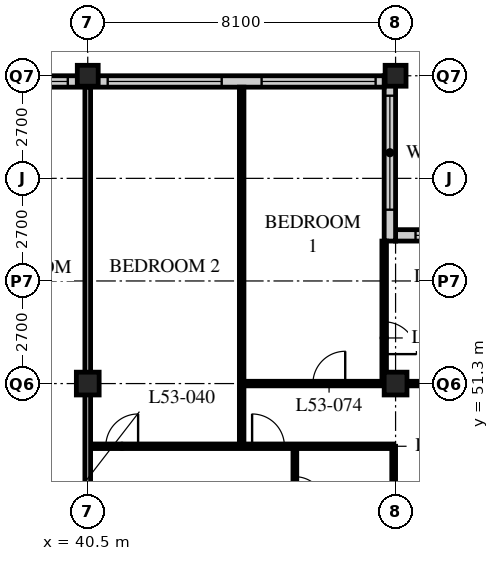
"""IFC4 building model, lengths in metres.
Left out: names, types, materials, properties, quantities, classifications, styles, units other than length and angle.
Written with IfcOpenShell. Run it as: python <this file> out.ifc"""

import sys

from ifc_helpers import new_model, si_unit, direction, frame, frame_2d, origin, origin_2d, place, context, subcontext, project, spatial, rectangle, hollow_rectangle, extrude, element, fill, save


model = new_model("IFC4")
c1 = context("Model", 3, precision=1e-05, world=origin(), true_north=direction((0.0, 1.0)))
c2 = subcontext(c1, "Body", "Model", "MODEL_VIEW")
j1 = project(units=[si_unit("LENGTHUNIT", "METRE"), si_unit("PLANEANGLEUNIT", "RADIAN")], contexts=[c1])
p1 = place(None, origin())
s1 = spatial("IfcSite", under=j1, at=p1, CompositionType="ELEMENT")
p2 = place(p1, origin())
s2 = spatial("IfcBuilding", under=s1, at=p2, CompositionType="ELEMENT")
p3 = place(p2, frame((0.0, 0.0, 206.4)))
s3 = spatial("IfcBuildingStorey", under=s2, at=p3, CompositionType="ELEMENT", Elevation=206.4)
p4 = place(p3, frame((40.5, 51.3, 0.0), z_axis=(0.0, 0.0, 1.0), x_axis=(1.0, 0.0, 0.0)))
e1 = element("IfcColumn", 1, at=p4, inside=s3, PredefinedType="COLUMN", context=c2, shape_type="SweptSolid", body=[
    extrude(hollow_rectangle(XDim=0.6, YDim=0.6, WallThickness=0.05, at=origin_2d()), origin(), (0.0, 0.0, 1.0), 3.6),
])
p5 = place(p3, frame((40.5, 59.4, 0.0), z_axis=(0.0, 0.0, 1.0), x_axis=(1.0, 0.0, 0.0)))
e2 = element("IfcColumn", 2, at=p5, inside=s3, PredefinedType="COLUMN", context=c2, shape_type="SweptSolid", body=[
    extrude(hollow_rectangle(XDim=0.55, YDim=0.55, WallThickness=0.045, at=origin_2d()), origin(), (0.0, 0.0, 1.0), 3.6),
])
p6 = place(p3, frame((48.6, 51.3, 0.0), z_axis=(0.0, 0.0, 1.0), x_axis=(1.0, 0.0, 0.0)))
e3 = element("IfcColumn", 3, at=p6, inside=s3, PredefinedType="COLUMN", context=c2, shape_type="SweptSolid", body=[
    extrude(hollow_rectangle(XDim=0.6, YDim=0.6, WallThickness=0.05, at=origin_2d()), origin(), (0.0, 0.0, 1.0), 3.6),
])
p7 = place(p3, frame((48.6, 59.4, 0.0), z_axis=(0.0, 0.0, 1.0), x_axis=(1.0, 0.0, 0.0)))
e4 = element("IfcColumn", 4, at=p7, inside=s3, PredefinedType="COLUMN", context=c2, shape_type="SweptSolid", body=[
    extrude(hollow_rectangle(XDim=0.55, YDim=0.55, WallThickness=0.045, at=origin_2d()), origin(), (0.0, 0.0, 1.0), 3.6),
])
p8 = place(p3, frame((52.35, 55.2, 0.0), z_axis=(0.0, 0.0, 1.0), x_axis=(-1.0, 0.0, 0.0)))
e5 = element("IfcWall", 5, at=p8, inside=s3, PredefinedType="SOLIDWALL", context=c2, shape_type="SweptSolid", body=[
    extrude(rectangle(XDim=3.75, YDim=0.3, at=frame_2d((1.875, 0.0))), origin(), (0.0, 0.0, 1.0), 3.39),
])
p9 = place(p8, frame((0.225, 0.0, 0.6)))
e6 = element("IfcOpeningElement", 6, at=p9, cuts=e5, PredefinedType="OPENING", context=c2, shape_type="SweptSolid", body=[
    extrude(rectangle(XDim=3.0, YDim=2.0, at=frame_2d((1.5, 1.0))), frame((0.0, 0.16, 0.0), z_axis=(0.0, -1.0, 0.0), x_axis=(1.0, 0.0, 0.0)), (0.0, 0.0, 1.0), 0.32),
])
p10 = place(p3, frame((48.45, 55.05, 0.0), z_axis=(0.0, 0.0, 1.0), x_axis=(0.0, 1.0, 0.0)))
e7 = element("IfcWall", 7, at=p10, inside=s3, PredefinedType="SOLIDWALL", context=c2, shape_type="SweptSolid", body=[
    extrude(rectangle(XDim=4.35, YDim=0.3, at=frame_2d((2.175, 0.0))), origin(), (0.0, 0.0, 1.0), 3.39),
])
p11 = place(p10, frame((0.825, 0.0, 0.6)))
e8 = element("IfcOpeningElement", 8, at=p11, cuts=e7, PredefinedType="OPENING", context=c2, shape_type="SweptSolid", body=[
    extrude(rectangle(XDim=3.0, YDim=2.0, at=frame_2d((1.5, 1.0))), frame((0.0, 0.16, 0.0), z_axis=(0.0, -1.0, 0.0), x_axis=(1.0, 0.0, 0.0)), (0.0, 0.0, 1.0), 0.32),
])
p12 = place(p3, frame((48.3, 59.25, 0.0), z_axis=(0.0, 0.0, 1.0), x_axis=(-1.0, 0.0, 0.0)))
e9 = element("IfcWall", 9, at=p12, inside=s3, PredefinedType="SOLIDWALL", context=c2, shape_type="SweptSolid", body=[
    extrude(rectangle(XDim=40.2, YDim=0.3, at=frame_2d((20.1, 0.0))), origin(), (0.0, 0.0, 1.0), 3.39),
])
p13 = place(p12, frame((0.225, 0.0, 0.6)))
e10 = element("IfcOpeningElement", 10, at=p13, cuts=e9, PredefinedType="OPENING", context=c2, shape_type="SweptSolid", body=[
    extrude(rectangle(XDim=3.0, YDim=2.4, at=frame_2d((1.5, 1.2))), frame((0.0, 0.16, 0.0), z_axis=(0.0, -1.0, 0.0), x_axis=(1.0, 0.0, 0.0)), (0.0, 0.0, 1.0), 0.32),
])
p14 = place(p12, frame((4.275, 0.0, 0.6)))
e11 = element("IfcOpeningElement", 11, at=p14, cuts=e9, PredefinedType="OPENING", context=c2, shape_type="SweptSolid", body=[
    extrude(rectangle(XDim=3.0, YDim=2.4, at=frame_2d((1.5, 1.2))), frame((0.0, 0.16, 0.0), z_axis=(0.0, -1.0, 0.0), x_axis=(1.0, 0.0, 0.0)), (0.0, 0.0, 1.0), 0.32),
])
p15 = place(p12, frame((8.325, 0.0, 0.6)))
e12 = element("IfcOpeningElement", 12, at=p15, cuts=e9, PredefinedType="OPENING", context=c2, shape_type="SweptSolid", body=[
    extrude(rectangle(XDim=3.0, YDim=2.4, at=frame_2d((1.5, 1.2))), frame((0.0, 0.16, 0.0), z_axis=(0.0, -1.0, 0.0), x_axis=(1.0, 0.0, 0.0)), (0.0, 0.0, 1.0), 0.32),
])
p16 = place(p12, frame((12.375, 0.0, 0.6)))
e13 = element("IfcOpeningElement", 13, at=p16, cuts=e9, PredefinedType="OPENING", context=c2, shape_type="SweptSolid", body=[
    extrude(rectangle(XDim=3.0, YDim=2.4, at=frame_2d((1.5, 1.2))), frame((0.0, 0.16, 0.0), z_axis=(0.0, -1.0, 0.0), x_axis=(1.0, 0.0, 0.0)), (0.0, 0.0, 1.0), 0.32),
])
p17 = place(p12, frame((16.425, 0.0, 0.6)))
e14 = element("IfcOpeningElement", 14, at=p17, cuts=e9, PredefinedType="OPENING", context=c2, shape_type="SweptSolid", body=[
    extrude(rectangle(XDim=3.0, YDim=2.4, at=frame_2d((1.5, 1.2))), frame((0.0, 0.16, 0.0), z_axis=(0.0, -1.0, 0.0), x_axis=(1.0, 0.0, 0.0)), (0.0, 0.0, 1.0), 0.32),
])
p18 = place(p12, frame((20.475, 0.0, 0.6)))
e15 = element("IfcOpeningElement", 15, at=p18, cuts=e9, PredefinedType="OPENING", context=c2, shape_type="SweptSolid", body=[
    extrude(rectangle(XDim=3.0, YDim=2.4, at=frame_2d((1.5, 1.2))), frame((0.0, 0.16, 0.0), z_axis=(0.0, -1.0, 0.0), x_axis=(1.0, 0.0, 0.0)), (0.0, 0.0, 1.0), 0.32),
])
p19 = place(p12, frame((24.525, 0.0, 0.6)))
e16 = element("IfcOpeningElement", 16, at=p19, cuts=e9, PredefinedType="OPENING", context=c2, shape_type="SweptSolid", body=[
    extrude(rectangle(XDim=3.0, YDim=2.4, at=frame_2d((1.5, 1.2))), frame((0.0, 0.16, 0.0), z_axis=(0.0, -1.0, 0.0), x_axis=(1.0, 0.0, 0.0)), (0.0, 0.0, 1.0), 0.32),
])
p20 = place(p12, frame((28.575, 0.0, 0.6)))
e17 = element("IfcOpeningElement", 17, at=p20, cuts=e9, PredefinedType="OPENING", context=c2, shape_type="SweptSolid", body=[
    extrude(rectangle(XDim=3.0, YDim=2.4, at=frame_2d((1.5, 1.2))), frame((0.0, 0.16, 0.0), z_axis=(0.0, -1.0, 0.0), x_axis=(1.0, 0.0, 0.0)), (0.0, 0.0, 1.0), 0.32),
])
p21 = place(p12, frame((32.625, 0.0, 0.6)))
e18 = element("IfcOpeningElement", 18, at=p21, cuts=e9, PredefinedType="OPENING", context=c2, shape_type="SweptSolid", body=[
    extrude(rectangle(XDim=3.0, YDim=2.4, at=frame_2d((1.5, 1.2))), frame((0.0, 0.16, 0.0), z_axis=(0.0, -1.0, 0.0), x_axis=(1.0, 0.0, 0.0)), (0.0, 0.0, 1.0), 0.32),
])
p22 = place(p12, frame((36.675, 0.0, 0.6)))
e19 = element("IfcOpeningElement", 19, at=p22, cuts=e9, PredefinedType="OPENING", context=c2, shape_type="SweptSolid", body=[
    extrude(rectangle(XDim=3.0, YDim=2.4, at=frame_2d((1.5, 1.2))), frame((0.0, 0.16, 0.0), z_axis=(0.0, -1.0, 0.0), x_axis=(1.0, 0.0, 0.0)), (0.0, 0.0, 1.0), 0.32),
])
p23 = place(p3, frame((40.5, 49.65, 0.0), z_axis=(0.0, 0.0, 1.0), x_axis=(1.0, 0.0, 0.0)))
e20 = element("IfcWall", 20, at=p23, inside=s3, PredefinedType="PARTITIONING", context=c2, shape_type="SweptSolid", body=[
    extrude(rectangle(XDim=8.05, YDim=0.12, at=frame_2d((4.025, 0.0))), origin(), (0.0, 0.0, 1.0), 3.39),
])
p24 = place(p23, frame((0.475, 0.0, 0.0)))
e21 = element("IfcOpeningElement", 21, at=p24, cuts=e20, PredefinedType="OPENING", context=c2, shape_type="SweptSolid", body=[
    extrude(rectangle(XDim=0.85, YDim=2.1, at=frame_2d((0.425, 1.05))), frame((0.0, 0.07, 0.0), z_axis=(0.0, -1.0, 0.0), x_axis=(1.0, 0.0, 0.0)), (0.0, 0.0, 1.0), 0.14),
])
p25 = place(p23, frame((4.325, 0.0, 0.0)))
e22 = element("IfcOpeningElement", 22, at=p25, cuts=e20, PredefinedType="OPENING", context=c2, shape_type="SweptSolid", body=[
    extrude(rectangle(XDim=0.85, YDim=2.1, at=frame_2d((0.425, 1.05))), frame((0.0, 0.07, 0.0), z_axis=(0.0, -1.0, 0.0), x_axis=(1.0, 0.0, 0.0)), (0.0, 0.0, 1.0), 0.14),
])
p26 = place(p3, frame((45.95, 47.25, 0.0), z_axis=(0.0, 0.0, 1.0), x_axis=(0.0, 1.0, 0.0)))
e23 = element("IfcWall", 23, at=p26, inside=s3, PredefinedType="PARTITIONING", context=c2, shape_type="SweptSolid", body=[
    extrude(rectangle(XDim=2.4, YDim=0.1, at=frame_2d((1.2, 0.0))), origin(), (0.0, 0.0, 1.0), 3.39),
])
p27 = place(p26, frame((0.8, 0.0, 0.0)))
e24 = element("IfcOpeningElement", 24, at=p27, cuts=e23, PredefinedType="OPENING", context=c2, shape_type="SweptSolid", body=[
    extrude(rectangle(XDim=0.8, YDim=2.1, at=frame_2d((0.4, 1.05))), frame((0.0, 0.06, 0.0), z_axis=(0.0, -1.0, 0.0), x_axis=(1.0, 0.0, 0.0)), (0.0, 0.0, 1.0), 0.12),
])
p28 = place(p3, frame((48.55, 47.25, 0.0), z_axis=(0.0, 0.0, 1.0), x_axis=(0.0, 1.0, 0.0)))
e25 = element("IfcWall", 25, at=p28, inside=s3, PredefinedType="PARTITIONING", context=c2, shape_type="SweptSolid", body=[
    extrude(rectangle(XDim=2.4, YDim=0.1, at=frame_2d((1.2, 0.0))), origin(), (0.0, 0.0, 1.0), 2.778),
])
p29 = place(p3, frame((44.55, 49.65, 0.0), z_axis=(0.0, 0.0, 1.0), x_axis=(0.0, 1.0, 0.0)))
e26 = element("IfcWall", 26, at=p29, inside=s3, PredefinedType="PARTITIONING", context=c2, shape_type="SweptSolid", body=[
    extrude(rectangle(XDim=9.45, YDim=0.12, at=frame_2d((4.725, 0.0))), origin(), (0.0, 0.0, 1.0), 3.39),
])
p30 = place(p3, frame((44.55, 51.3, 0.0), z_axis=(0.0, 0.0, 1.0), x_axis=(1.0, 0.0, 0.0)))
e27 = element("IfcWall", 27, at=p30, inside=s3, PredefinedType="PARTITIONING", context=c2, shape_type="SweptSolid", body=[
    extrude(rectangle(XDim=7.8, YDim=0.12, at=frame_2d((3.9, 0.0))), origin(), (0.0, 0.0, 1.0), 2.778),
])
p31 = place(p30, frame((1.875, 0.0, 0.0)))
e28 = element("IfcOpeningElement", 28, at=p31, cuts=e27, PredefinedType="OPENING", context=c2, shape_type="SweptSolid", body=[
    extrude(rectangle(XDim=0.85, YDim=2.1, at=frame_2d((0.425, 1.05))), frame((0.0, 0.07, 0.0), z_axis=(0.0, -1.0, 0.0), x_axis=(1.0, 0.0, 0.0)), (0.0, 0.0, 1.0), 0.14),
])
p32 = place(p3, frame((40.5, 47.25, 0.0), z_axis=(0.0, 0.0, 1.0), x_axis=(0.0, 1.0, 0.0)))
e29 = element("IfcWall", 29, at=p32, inside=s3, PredefinedType="PARTITIONING", context=c2, shape_type="SweptSolid", body=[
    extrude(rectangle(XDim=11.85, YDim=0.15, at=frame_2d((5.925, 0.0))), origin(), (0.0, 0.0, 1.0), 2.778),
])
p33 = place(p3, frame((48.3, 51.3, 0.0), z_axis=(0.0, 0.0, 1.0), x_axis=(0.0, 1.0, 0.0)))
e30 = element("IfcWall", 30, at=p33, inside=s3, PredefinedType="PARTITIONING", context=c2, shape_type="SweptSolid", body=[
    extrude(rectangle(XDim=3.75, YDim=0.12, at=frame_2d((1.875, 0.0))), origin(), (0.0, 0.0, 1.0), 3.39),
])
p34 = place(p33, frame((0.775, 0.0, 0.0)))
e31 = element("IfcOpeningElement", 31, at=p34, cuts=e30, PredefinedType="OPENING", context=c2, shape_type="SweptSolid", body=[
    extrude(rectangle(XDim=0.85, YDim=2.1, at=frame_2d((0.425, 1.05))), frame((0.0, 0.07, 0.0), z_axis=(0.0, -1.0, 0.0), x_axis=(1.0, 0.0, 0.0)), (0.0, 0.0, 1.0), 0.14),
])
p35 = place(p9, origin())
e32 = element("IfcWindow", 32, at=p35, inside=s3, PartitioningType="SINGLE_PANEL", PredefinedType="WINDOW", context=c2, shape_type="SweptSolid", body=[
    extrude(rectangle(XDim=3.0, YDim=2.0, at=frame_2d((1.5, 1.0))), frame((0.0, 0.03, 0.0), z_axis=(0.0, -1.0, 0.0), x_axis=(1.0, 0.0, 0.0)), (0.0, 0.0, 1.0), 0.06),
])
fill(e6, e32)
p36 = place(p11, origin())
e33 = element("IfcWindow", 33, at=p36, inside=s3, PartitioningType="SINGLE_PANEL", PredefinedType="WINDOW", context=c2, shape_type="SweptSolid", body=[
    extrude(rectangle(XDim=3.0, YDim=2.0, at=frame_2d((1.5, 1.0))), frame((0.0, 0.03, 0.0), z_axis=(0.0, -1.0, 0.0), x_axis=(1.0, 0.0, 0.0)), (0.0, 0.0, 1.0), 0.06),
])
fill(e8, e33)
p37 = place(p13, origin())
e34 = element("IfcWindow", 34, at=p37, inside=s3, PartitioningType="SINGLE_PANEL", PredefinedType="WINDOW", context=c2, shape_type="SweptSolid", body=[
    extrude(rectangle(XDim=3.0, YDim=2.4, at=frame_2d((1.5, 1.2))), frame((0.0, 0.03, 0.0), z_axis=(0.0, -1.0, 0.0), x_axis=(1.0, 0.0, 0.0)), (0.0, 0.0, 1.0), 0.06),
])
fill(e10, e34)
p38 = place(p14, origin())
e35 = element("IfcWindow", 35, at=p38, inside=s3, PartitioningType="SINGLE_PANEL", PredefinedType="WINDOW", context=c2, shape_type="SweptSolid", body=[
    extrude(rectangle(XDim=3.0, YDim=2.4, at=frame_2d((1.5, 1.2))), frame((0.0, 0.03, 0.0), z_axis=(0.0, -1.0, 0.0), x_axis=(1.0, 0.0, 0.0)), (0.0, 0.0, 1.0), 0.06),
])
fill(e11, e35)
p39 = place(p15, origin())
e36 = element("IfcWindow", 36, at=p39, inside=s3, PartitioningType="SINGLE_PANEL", PredefinedType="WINDOW", context=c2, shape_type="SweptSolid", body=[
    extrude(rectangle(XDim=3.0, YDim=2.4, at=frame_2d((1.5, 1.2))), frame((0.0, 0.03, 0.0), z_axis=(0.0, -1.0, 0.0), x_axis=(1.0, 0.0, 0.0)), (0.0, 0.0, 1.0), 0.06),
])
fill(e12, e36)
p40 = place(p24, origin())
e37 = element("IfcDoor", 37, at=p40, inside=s3, OperationType="SINGLE_SWING_RIGHT", PredefinedType="DOOR", context=c2, shape_type="SweptSolid", body=[
    extrude(rectangle(XDim=0.85, YDim=2.1, at=frame_2d((0.425, 1.05))), frame((0.0, 0.025, 0.0), z_axis=(0.0, -1.0, 0.0), x_axis=(1.0, 0.0, 0.0)), (0.0, 0.0, 1.0), 0.05),
])
fill(e21, e37)
p41 = place(p27, origin())
e38 = element("IfcDoor", 38, at=p41, inside=s3, OperationType="SINGLE_SWING_RIGHT", PredefinedType="DOOR", context=c2, shape_type="SweptSolid", body=[
    extrude(rectangle(XDim=0.8, YDim=2.1, at=frame_2d((0.4, 1.05))), frame((0.0, 0.025, 0.0), z_axis=(0.0, -1.0, 0.0), x_axis=(1.0, 0.0, 0.0)), (0.0, 0.0, 1.0), 0.05),
])
fill(e24, e38)
p42 = place(p25, origin())
e39 = element("IfcDoor", 39, at=p42, inside=s3, OperationType="SINGLE_SWING_LEFT", PredefinedType="DOOR", context=c2, shape_type="SweptSolid", body=[
    extrude(rectangle(XDim=0.85, YDim=2.1, at=frame_2d((0.425, 1.05))), frame((0.0, 0.025, 0.0), z_axis=(0.0, -1.0, 0.0), x_axis=(1.0, 0.0, 0.0)), (0.0, 0.0, 1.0), 0.05),
])
fill(e22, e39)
p43 = place(p31, origin())
e40 = element("IfcDoor", 40, at=p43, inside=s3, OperationType="SINGLE_SWING_RIGHT", PredefinedType="DOOR", context=c2, shape_type="SweptSolid", body=[
    extrude(rectangle(XDim=0.85, YDim=2.1, at=frame_2d((0.425, 1.05))), frame((0.0, 0.025, 0.0), z_axis=(0.0, -1.0, 0.0), x_axis=(1.0, 0.0, 0.0)), (0.0, 0.0, 1.0), 0.05),
])
fill(e28, e40)
p44 = place(p34, origin())
e41 = element("IfcDoor", 41, at=p44, inside=s3, OperationType="SINGLE_SWING_RIGHT", PredefinedType="DOOR", context=c2, shape_type="SweptSolid", body=[
    extrude(rectangle(XDim=0.85, YDim=2.1, at=frame_2d((0.425, 1.05))), frame((0.0, 0.025, 0.0), z_axis=(0.0, -1.0, 0.0), x_axis=(1.0, 0.0, 0.0)), (0.0, 0.0, 1.0), 0.05),
])
fill(e31, e41)
save(model, sys.argv[1])
